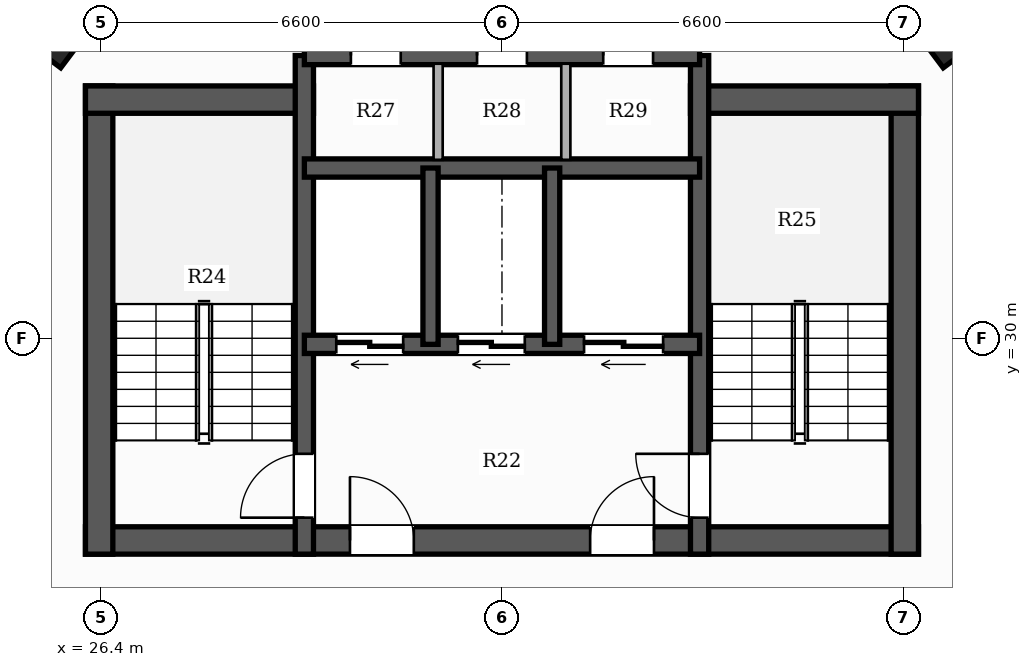
"""IFC4 building model, lengths in metres.
Left out: names, types, materials, properties, quantities, classifications, styles, units other than length and angle.
Written with IfcOpenShell. Run it as: python <this file> out.ifc"""

import sys

from ifc_helpers import new_model, si_unit, direction, frame, frame_2d, origin, origin_2d, place, context, subcontext, project, spatial, rectangle, hollow_rectangle, extrude, element, fill, save


model = new_model("IFC4")
c1 = context("Model", 3, precision=1e-05, world=origin(), true_north=direction((0.0, 1.0)))
c2 = subcontext(c1, "Body", "Model", "MODEL_VIEW")
j1 = project(units=[si_unit("LENGTHUNIT", "METRE"), si_unit("PLANEANGLEUNIT", "RADIAN")], contexts=[c1])
p1 = place(None, origin())
s1 = spatial("IfcSite", under=j1, at=p1, CompositionType="ELEMENT")
p2 = place(p1, origin())
s2 = spatial("IfcBuilding", under=s1, at=p2, CompositionType="ELEMENT")
p3 = place(p2, frame((0.0, 0.0, 36.8)))
s3 = spatial("IfcBuildingStorey", under=s2, at=p3, CompositionType="ELEMENT", Elevation=36.8)
p4 = place(p3, frame((26.15, 26.675, 0.0), z_axis=(0.0, 0.0, 1.0), x_axis=(1.0, 0.0, 0.0)))
e1 = element("IfcWall", 1, at=p4, inside=s3, PredefinedType="SHEAR", context=c2, shape_type="SweptSolid", body=[
    extrude(rectangle(XDim=13.7, YDim=0.45, at=frame_2d((6.85, 0.0))), origin(), (0.0, 0.0, 1.0), 3.3),
])
p5 = place(p4, frame((4.35, 0.0, 0.0)))
e2 = element("IfcOpeningElement", 2, at=p5, cuts=e1, PredefinedType="OPENING", context=c2, shape_type="SweptSolid", body=[
    extrude(rectangle(XDim=1.05, YDim=2.15, at=frame_2d((0.525, 1.075))), frame((0.0, 0.235, 0.0), z_axis=(0.0, -1.0, 0.0), x_axis=(1.0, 0.0, 0.0)), (0.0, 0.0, 1.0), 0.47),
])
p6 = place(p4, frame((8.3, 0.0, 0.0)))
e3 = element("IfcOpeningElement", 3, at=p6, cuts=e1, PredefinedType="OPENING", context=c2, shape_type="SweptSolid", body=[
    extrude(rectangle(XDim=1.05, YDim=2.15, at=frame_2d((0.525, 1.075))), frame((0.0, 0.235, 0.0), z_axis=(0.0, -1.0, 0.0), x_axis=(1.0, 0.0, 0.0)), (0.0, 0.0, 1.0), 0.47),
])
p7 = place(p3, frame((26.375, 26.45, 0.0), z_axis=(0.0, 0.0, 1.0), x_axis=(0.0, 1.0, 0.0)))
e4 = element("IfcWall", 4, at=p7, inside=s3, PredefinedType="SHEAR", context=c2, shape_type="SweptSolid", body=[
    extrude(rectangle(XDim=7.7, YDim=0.45, at=frame_2d((3.85, 0.0))), origin(), (0.0, 0.0, 1.0), 3.3),
])
p8 = place(p3, frame((26.15, 33.925, 0.0), z_axis=(0.0, 0.0, 1.0), x_axis=(1.0, 0.0, 0.0)))
e5 = element("IfcWall", 5, at=p8, inside=s3, PredefinedType="SHEAR", context=c2, shape_type="SweptSolid", body=[
    extrude(rectangle(XDim=3.75, YDim=0.45, at=frame_2d((1.875, 0.0))), origin(), (0.0, 0.0, 1.0), 3.3),
])
p9 = place(p3, frame((39.625, 26.45, 0.0), z_axis=(0.0, 0.0, 1.0), x_axis=(0.0, 1.0, 0.0)))
e6 = element("IfcWall", 6, at=p9, inside=s3, PredefinedType="SHEAR", context=c2, shape_type="SweptSolid", body=[
    extrude(rectangle(XDim=7.7, YDim=0.45, at=frame_2d((3.85, 0.0))), origin(), (0.0, 0.0, 1.0), 3.3),
])
p10 = place(p3, frame((36.1, 33.925, 0.0), z_axis=(0.0, 0.0, 1.0), x_axis=(1.0, 0.0, 0.0)))
e7 = element("IfcWall", 7, at=p10, inside=s3, PredefinedType="SHEAR", context=c2, shape_type="SweptSolid", body=[
    extrude(rectangle(XDim=3.75, YDim=0.45, at=frame_2d((1.875, 0.0))), origin(), (0.0, 0.0, 1.0), 3.3),
])
p11 = place(p3, frame((29.75, 26.45, 0.0), z_axis=(0.0, 0.0, 1.0), x_axis=(0.0, 1.0, 0.0)))
e8 = element("IfcWall", 8, at=p11, inside=s3, PredefinedType="SHEAR", context=c2, shape_type="SweptSolid", body=[
    extrude(rectangle(XDim=8.2, YDim=0.3, at=frame_2d((4.1, 0.0))), origin(), (0.0, 0.0, 1.0), 3.3),
])
p12 = place(p11, frame((0.6, 0.0, 0.0)))
e9 = element("IfcOpeningElement", 9, at=p12, cuts=e8, PredefinedType="OPENING", context=c2, shape_type="SweptSolid", body=[
    extrude(rectangle(XDim=1.05, YDim=2.15, at=frame_2d((0.525, 1.075))), frame((0.0, 0.16, 0.0), z_axis=(0.0, -1.0, 0.0), x_axis=(1.0, 0.0, 0.0)), (0.0, 0.0, 1.0), 0.32),
])
p13 = place(p3, frame((36.25, 26.45, 0.0), z_axis=(0.0, 0.0, 1.0), x_axis=(0.0, 1.0, 0.0)))
e10 = element("IfcWall", 10, at=p13, inside=s3, PredefinedType="SHEAR", context=c2, shape_type="SweptSolid", body=[
    extrude(rectangle(XDim=8.2, YDim=0.3, at=frame_2d((4.1, 0.0))), origin(), (0.0, 0.0, 1.0), 3.3),
])
p14 = place(p13, frame((0.6, 0.0, 0.0)))
e11 = element("IfcOpeningElement", 11, at=p14, cuts=e10, PredefinedType="OPENING", context=c2, shape_type="SweptSolid", body=[
    extrude(rectangle(XDim=1.05, YDim=2.15, at=frame_2d((0.525, 1.075))), frame((0.0, 0.16, 0.0), z_axis=(0.0, -1.0, 0.0), x_axis=(1.0, 0.0, 0.0)), (0.0, 0.0, 1.0), 0.32),
])
p15 = place(p3, frame((36.25, 29.9, 0.0), z_axis=(0.0, 0.0, 1.0), x_axis=(-1.0, 0.0, 0.0)))
e12 = element("IfcWall", 12, at=p15, inside=s3, PredefinedType="SHEAR", context=c2, shape_type="SweptSolid", body=[
    extrude(rectangle(XDim=6.5, YDim=0.3, at=frame_2d((3.25, 0.0))), origin(), (0.0, 0.0, 1.0), 3.3),
])
p16 = place(p15, frame((4.875, 0.0, 0.0)))
e13 = element("IfcOpeningElement", 13, at=p16, cuts=e12, PredefinedType="OPENING", context=c2, shape_type="SweptSolid", body=[
    extrude(rectangle(XDim=1.1, YDim=2.2, at=frame_2d((0.55, 1.1))), frame((0.0, 0.16, 0.0), z_axis=(0.0, -1.0, 0.0), x_axis=(1.0, 0.0, 0.0)), (0.0, 0.0, 1.0), 0.32),
])
p17 = place(p15, frame((2.875, 0.0, 0.0)))
e14 = element("IfcOpeningElement", 14, at=p17, cuts=e12, PredefinedType="OPENING", context=c2, shape_type="SweptSolid", body=[
    extrude(rectangle(XDim=1.1, YDim=2.2, at=frame_2d((0.55, 1.1))), frame((0.0, 0.16, 0.0), z_axis=(0.0, -1.0, 0.0), x_axis=(1.0, 0.0, 0.0)), (0.0, 0.0, 1.0), 0.32),
])
p18 = place(p15, frame((0.6, 0.0, 0.0)))
e15 = element("IfcOpeningElement", 15, at=p18, cuts=e12, PredefinedType="OPENING", context=c2, shape_type="SweptSolid", body=[
    extrude(rectangle(XDim=1.3, YDim=2.2, at=frame_2d((0.65, 1.1))), frame((0.0, 0.16, 0.0), z_axis=(0.0, -1.0, 0.0), x_axis=(1.0, 0.0, 0.0)), (0.0, 0.0, 1.0), 0.32),
])
p19 = place(p3, frame((29.75, 32.8, 0.0), z_axis=(0.0, 0.0, 1.0), x_axis=(1.0, 0.0, 0.0)))
e16 = element("IfcWall", 16, at=p19, inside=s3, PredefinedType="SHEAR", context=c2, shape_type="SweptSolid", body=[
    extrude(rectangle(XDim=6.5, YDim=0.3, at=frame_2d((3.25, 0.0))), origin(), (0.0, 0.0, 1.0), 3.3),
])
for number, where, z_axis, x_axis in (
    (17, (31.825, 29.9, 0.0), (0.0, 0.0, 1.0), (0.0, 1.0, 0.0)),
    (18, (33.825, 29.9, 0.0), (0.0, 0.0, 1.0), (0.0, 1.0, 0.0)),
):
    element("IfcWall", number, at=place(p3, frame(where, z_axis=z_axis, x_axis=x_axis)), inside=s3, PredefinedType="SHEAR", context=c2, shape_type="SweptSolid", body=[
        extrude(rectangle(XDim=2.9, YDim=0.25, at=frame_2d((1.45, 0.0))), origin(), (0.0, 0.0, 1.0), 3.3),
    ])
p20 = place(p3, frame((29.75, 34.65, 0.0), z_axis=(0.0, 0.0, 1.0), x_axis=(1.0, 0.0, 0.0)))
e19 = element("IfcWall", 19, at=p20, inside=s3, PredefinedType="SHEAR", context=c2, shape_type="SweptSolid", body=[
    extrude(rectangle(XDim=6.5, YDim=0.3, at=frame_2d((3.25, 0.0))), origin(), (0.0, 0.0, 1.0), 3.3),
])
p21 = place(p20, frame((0.765, 0.0, 0.0)))
e20 = element("IfcOpeningElement", 20, at=p21, cuts=e19, PredefinedType="OPENING", context=c2, shape_type="SweptSolid", body=[
    extrude(rectangle(XDim=0.82, YDim=2.1, at=frame_2d((0.41, 1.05))), frame((0.0, 0.16, 0.0), z_axis=(0.0, -1.0, 0.0), x_axis=(1.0, 0.0, 0.0)), (0.0, 0.0, 1.0), 0.32),
])
p22 = place(p20, frame((2.84, 0.0, 0.0)))
e21 = element("IfcOpeningElement", 21, at=p22, cuts=e19, PredefinedType="OPENING", context=c2, shape_type="SweptSolid", body=[
    extrude(rectangle(XDim=0.82, YDim=2.1, at=frame_2d((0.41, 1.05))), frame((0.0, 0.16, 0.0), z_axis=(0.0, -1.0, 0.0), x_axis=(1.0, 0.0, 0.0)), (0.0, 0.0, 1.0), 0.32),
])
p23 = place(p20, frame((4.915, 0.0, 0.0)))
e22 = element("IfcOpeningElement", 22, at=p23, cuts=e19, PredefinedType="OPENING", context=c2, shape_type="SweptSolid", body=[
    extrude(rectangle(XDim=0.82, YDim=2.1, at=frame_2d((0.41, 1.05))), frame((0.0, 0.16, 0.0), z_axis=(0.0, -1.0, 0.0), x_axis=(1.0, 0.0, 0.0)), (0.0, 0.0, 1.0), 0.32),
])
for number, where, z_axis, x_axis in (
    (23, (25.648, 35.113, 0.0), (0.0, 0.0, 1.0), (0.6, 0.8, 0.0)),
    (24, (40.352, 35.113, 0.0), (0.0, 0.0, 1.0), (-0.6, 0.8, 0.0)),
):
    element("IfcColumn", number, at=place(p3, frame(where, z_axis=z_axis, x_axis=x_axis)), inside=s3, PredefinedType="COLUMN", context=c2, shape_type="SweptSolid", body=[
        extrude(hollow_rectangle(XDim=0.95, YDim=0.95, WallThickness=0.032, at=origin_2d()), origin(), (0.0, 0.0, 1.0), 3.3),
    ])
for number, where, z_axis, x_axis in (
    (25, (31.95, 32.935, 0.0), (0.0, 0.0, 1.0), (0.0, 1.0, 0.0)),
    (26, (34.05, 32.935, 0.0), (0.0, 0.0, 1.0), (0.0, 1.0, 0.0)),
):
    element("IfcWall", number, at=place(p3, frame(where, z_axis=z_axis, x_axis=x_axis)), inside=s3, PredefinedType="PARTITIONING", context=c2, shape_type="SweptSolid", body=[
        extrude(rectangle(XDim=1.58, YDim=0.15, at=frame_2d((0.79, 0.0))), origin(), (0.0, 0.0, 1.0), 3.06),
    ])
p24 = place(p12, origin())
e27 = element("IfcDoor", 27, at=p24, inside=s3, OperationType="SINGLE_SWING_LEFT", PredefinedType="DOOR", context=c2, shape_type="SweptSolid", body=[
    extrude(rectangle(XDim=1.05, YDim=2.15, at=frame_2d((0.525, 1.075))), frame((0.0, 0.025, 0.0), z_axis=(0.0, -1.0, 0.0), x_axis=(1.0, 0.0, 0.0)), (0.0, 0.0, 1.0), 0.05),
])
fill(e9, e27)
p25 = place(p14, origin())
e28 = element("IfcDoor", 28, at=p25, inside=s3, OperationType="SINGLE_SWING_RIGHT", PredefinedType="DOOR", context=c2, shape_type="SweptSolid", body=[
    extrude(rectangle(XDim=1.05, YDim=2.15, at=frame_2d((0.525, 1.075))), frame((0.0, 0.025, 0.0), z_axis=(0.0, -1.0, 0.0), x_axis=(1.0, 0.0, 0.0)), (0.0, 0.0, 1.0), 0.05),
])
fill(e11, e28)
p26 = place(p5, origin())
e29 = element("IfcDoor", 29, at=p26, inside=s3, OperationType="SINGLE_SWING_LEFT", PredefinedType="DOOR", context=c2, shape_type="SweptSolid", body=[
    extrude(rectangle(XDim=1.05, YDim=2.15, at=frame_2d((0.525, 1.075))), frame((0.0, 0.025, 0.0), z_axis=(0.0, -1.0, 0.0), x_axis=(1.0, 0.0, 0.0)), (0.0, 0.0, 1.0), 0.05),
])
fill(e2, e29)
p27 = place(p6, origin())
e30 = element("IfcDoor", 30, at=p27, inside=s3, OperationType="SINGLE_SWING_RIGHT", PredefinedType="DOOR", context=c2, shape_type="SweptSolid", body=[
    extrude(rectangle(XDim=1.05, YDim=2.15, at=frame_2d((0.525, 1.075))), frame((0.0, 0.025, 0.0), z_axis=(0.0, -1.0, 0.0), x_axis=(1.0, 0.0, 0.0)), (0.0, 0.0, 1.0), 0.05),
])
fill(e3, e30)
p28 = place(p16, origin())
e31 = element("IfcDoor", 31, at=p28, inside=s3, OperationType="DOUBLE_DOOR_SLIDING", PredefinedType="DOOR", context=c2, shape_type="SweptSolid", body=[
    extrude(rectangle(XDim=1.1, YDim=2.2, at=frame_2d((0.55, 1.1))), frame((0.0, 0.025, 0.0), z_axis=(0.0, -1.0, 0.0), x_axis=(1.0, 0.0, 0.0)), (0.0, 0.0, 1.0), 0.05),
])
fill(e13, e31)
p29 = place(p17, origin())
e32 = element("IfcDoor", 32, at=p29, inside=s3, OperationType="DOUBLE_DOOR_SLIDING", PredefinedType="DOOR", context=c2, shape_type="SweptSolid", body=[
    extrude(rectangle(XDim=1.1, YDim=2.2, at=frame_2d((0.55, 1.1))), frame((0.0, 0.025, 0.0), z_axis=(0.0, -1.0, 0.0), x_axis=(1.0, 0.0, 0.0)), (0.0, 0.0, 1.0), 0.05),
])
fill(e14, e32)
p30 = place(p18, origin())
e33 = element("IfcDoor", 33, at=p30, inside=s3, OperationType="DOUBLE_DOOR_SLIDING", PredefinedType="DOOR", context=c2, shape_type="SweptSolid", body=[
    extrude(rectangle(XDim=1.3, YDim=2.2, at=frame_2d((0.65, 1.1))), frame((0.0, 0.025, 0.0), z_axis=(0.0, -1.0, 0.0), x_axis=(1.0, 0.0, 0.0)), (0.0, 0.0, 1.0), 0.05),
])
fill(e15, e33)
p31 = place(p21, origin())
e34 = element("IfcDoor", 34, at=p31, inside=s3, OperationType="SINGLE_SWING_LEFT", PredefinedType="DOOR", context=c2, shape_type="SweptSolid", body=[
    extrude(rectangle(XDim=0.82, YDim=2.1, at=frame_2d((0.41, 1.05))), frame((0.0, 0.025, 0.0), z_axis=(0.0, -1.0, 0.0), x_axis=(1.0, 0.0, 0.0)), (0.0, 0.0, 1.0), 0.05),
])
fill(e20, e34)
p32 = place(p22, origin())
e35 = element("IfcDoor", 35, at=p32, inside=s3, OperationType="SINGLE_SWING_LEFT", PredefinedType="DOOR", context=c2, shape_type="SweptSolid", body=[
    extrude(rectangle(XDim=0.82, YDim=2.1, at=frame_2d((0.41, 1.05))), frame((0.0, 0.025, 0.0), z_axis=(0.0, -1.0, 0.0), x_axis=(1.0, 0.0, 0.0)), (0.0, 0.0, 1.0), 0.05),
])
fill(e21, e35)
p33 = place(p23, origin())
e36 = element("IfcDoor", 36, at=p33, inside=s3, OperationType="SINGLE_SWING_LEFT", PredefinedType="DOOR", context=c2, shape_type="SweptSolid", body=[
    extrude(rectangle(XDim=0.82, YDim=2.1, at=frame_2d((0.41, 1.05))), frame((0.0, 0.025, 0.0), z_axis=(0.0, -1.0, 0.0), x_axis=(1.0, 0.0, 0.0)), (0.0, 0.0, 1.0), 0.05),
])
fill(e22, e36)
save(model, sys.argv[1])
